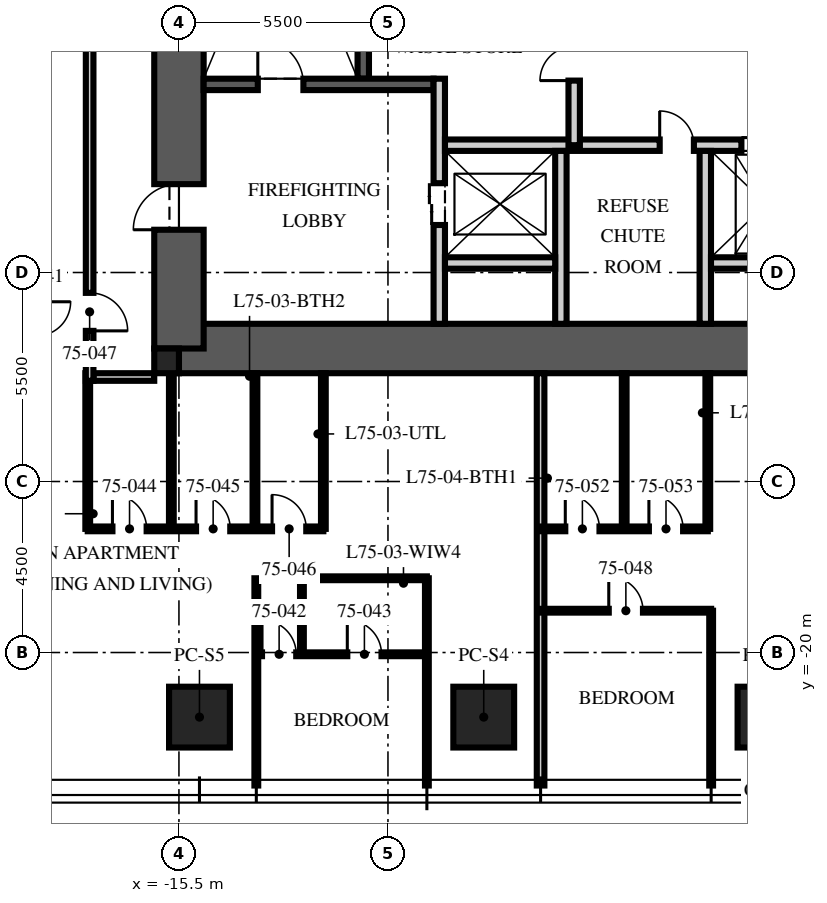
"""IFC4 building model, lengths in metres.
Left out: names, types, materials, properties, quantities, classifications, styles, units other than length and angle.
Written with IfcOpenShell. Run it as: python <this file> out.ifc"""

import sys

from ifc_helpers import new_model, si_unit, direction, frame, frame_2d, origin, origin_2d, place, context, subcontext, project, spatial, rectangle, extrude, element, fill, save


model = new_model("IFC4")
c1 = context("Model", 3, precision=1e-05, world=origin(), true_north=direction((0.0, 1.0)))
c2 = subcontext(c1, "Body", "Model", "MODEL_VIEW")
j1 = project(units=[si_unit("LENGTHUNIT", "METRE"), si_unit("PLANEANGLEUNIT", "RADIAN")], contexts=[c1])
p1 = place(None, origin())
s1 = spatial("IfcSite", under=j1, at=p1, CompositionType="ELEMENT")
p2 = place(p1, origin())
s2 = spatial("IfcBuilding", under=s1, at=p2, CompositionType="ELEMENT")
p3 = place(p2, frame((0.0, 0.0, 300.75)))
s3 = spatial("IfcBuildingStorey", under=s2, at=p3, CompositionType="ELEMENT", Elevation=300.75)
p4 = place(p3, frame((-15.5, -12.0, -0.25), z_axis=(0.0, 0.0, 1.0), x_axis=(1.0, 0.0, 0.0)))
e1 = element("IfcWall", 1, at=p4, inside=s3, PredefinedType="SHEAR", context=c2, shape_type="SweptSolid", body=[
    extrude(rectangle(XDim=31.0, YDim=1.3, at=frame_2d((15.5, 0.0))), origin(), (0.0, 0.0, 1.0), 3.75),
])
p5 = place(p3, frame((-15.5, -12.0, -0.25), z_axis=(0.0, 0.0, 1.0), x_axis=(0.0, 1.0, 0.0)))
e2 = element("IfcWall", 2, at=p5, inside=s3, PredefinedType="SHEAR", context=c2, shape_type="SweptSolid", body=[
    extrude(rectangle(XDim=24.0, YDim=1.3, at=frame_2d((12.0, 0.0))), origin(), (0.0, 0.0, 1.0), 3.75),
])
p6 = place(p5, frame((3.125, 0.0, 0.25)))
e3 = element("IfcOpeningElement", 3, at=p6, cuts=e2, PredefinedType="OPENING", context=c2, shape_type="SweptSolid", body=[
    extrude(rectangle(XDim=1.2, YDim=2.1, at=frame_2d((0.6, 1.05))), frame((0.0, 0.66, 0.0), z_axis=(0.0, -1.0, 0.0), x_axis=(1.0, 0.0, 0.0)), (0.0, 0.0, 1.0), 1.32),
])
p7 = place(p5, frame((19.375, 0.0, 0.25)))
e4 = element("IfcOpeningElement", 4, at=p7, cuts=e2, PredefinedType="OPENING", context=c2, shape_type="SweptSolid", body=[
    extrude(rectangle(XDim=1.8, YDim=2.1, at=frame_2d((0.9, 1.05))), frame((0.0, 0.66, 0.0), z_axis=(0.0, -1.0, 0.0), x_axis=(1.0, 0.0, 0.0)), (0.0, 0.0, 1.0), 1.32),
])
p8 = place(p3, frame((-15.825, -12.325, -0.25), z_axis=(0.0, 0.0, 1.0), x_axis=(1.0, 0.0, 0.0)))
e5 = element("IfcColumn", 5, at=p8, inside=s3, PredefinedType="COLUMN", context=c2, shape_type="SweptSolid", body=[
    extrude(rectangle(XDim=0.65, YDim=0.65, at=origin_2d()), origin(), (0.0, 0.0, 1.0), 3.75),
])
for number, where, z_axis, x_axis in (
    (6, (0.0, -21.7, 0.0), (0.0, 0.0, 1.0), (1.0, 0.0, 0.0)),
    (7, (-7.48, -21.7, 0.0), (0.0, 0.0, 1.0), (1.0, 0.0, 0.0)),
    (8, (-14.96, -21.7, 0.0), (0.0, 0.0, 1.0), (1.0, 0.0, 0.0)),
):
    element("IfcColumn", number, at=place(p3, frame(where, z_axis=z_axis, x_axis=x_axis)), inside=s3, PredefinedType="COLUMN", context=c2, shape_type="SweptSolid", body=[
        extrude(rectangle(XDim=1.6, YDim=1.6, at=origin_2d()), origin(), (0.0, 0.0, 1.0), 3.75),
    ])
p9 = place(p3, frame((-10.65, -4.9, 0.0), z_axis=(0.0, 0.0, 1.0), x_axis=(0.0, 1.0, 0.0)))
e9 = element("IfcWall", 9, at=p9, inside=s3, PredefinedType="SOLIDWALL", context=c2, shape_type="SweptSolid", body=[
    extrude(rectangle(XDim=10.1, YDim=0.3, at=frame_2d((5.05, 0.0))), origin(), (0.0, 0.0, 1.0), 3.5),
])
p10 = place(p3, frame((-14.85, -5.05, 0.0), z_axis=(0.0, 0.0, 1.0), x_axis=(1.0, 0.0, 0.0)))
e10 = element("IfcWall", 10, at=p10, inside=s3, PredefinedType="SOLIDWALL", context=c2, shape_type="SweptSolid", body=[
    extrude(rectangle(XDim=6.05, YDim=0.3, at=frame_2d((3.025, 0.0))), origin(), (0.0, 0.0, 1.0), 3.5),
])
p11 = place(p10, frame((1.425, 0.0, 0.0)))
e11 = element("IfcOpeningElement", 11, at=p11, cuts=e10, PredefinedType="OPENING", context=c2, shape_type="SweptSolid", body=[
    extrude(rectangle(XDim=1.2, YDim=2.1, at=frame_2d((0.6, 1.05))), frame((0.0, 0.16, 0.0), z_axis=(0.0, -1.0, 0.0), x_axis=(1.0, 0.0, 0.0)), (0.0, 0.0, 1.0), 0.32),
])
p12 = place(p3, frame((-8.65, -11.35, 0.0), z_axis=(0.0, 0.0, 1.0), x_axis=(0.0, 1.0, 0.0)))
e12 = element("IfcWall", 12, at=p12, inside=s3, PredefinedType="PARTITIONING", context=c2, shape_type="SweptSolid", body=[
    extrude(rectangle(XDim=6.45, YDim=0.3, at=frame_2d((3.225, 0.0))), origin(), (0.0, 0.0, 1.0), 3.5),
])
p13 = place(p12, frame((2.6, 0.0, 0.0)))
e13 = element("IfcOpeningElement", 13, at=p13, cuts=e12, PredefinedType="OPENING", context=c2, shape_type="SweptSolid", body=[
    extrude(rectangle(XDim=1.1, YDim=2.1, at=frame_2d((0.55, 1.05))), frame((0.0, 0.16, 0.0), z_axis=(0.0, -1.0, 0.0), x_axis=(1.0, 0.0, 0.0)), (0.0, 0.0, 1.0), 0.32),
])
p14 = place(p3, frame((-8.5, -6.65, 0.0), z_axis=(0.0, 0.0, 1.0), x_axis=(1.0, 0.0, 0.0)))
e14 = element("IfcWall", 14, at=p14, inside=s3, PredefinedType="PARTITIONING", context=c2, shape_type="SweptSolid", body=[
    extrude(rectangle(XDim=17.0, YDim=0.3, at=frame_2d((8.5, 0.0))), origin(), (0.0, 0.0, 1.0), 3.5),
])
p15 = place(p14, frame((7.8, 0.0, 0.0)))
e15 = element("IfcOpeningElement", 15, at=p15, cuts=e14, PredefinedType="OPENING", context=c2, shape_type="SweptSolid", body=[
    extrude(rectangle(XDim=1.3, YDim=2.4, at=frame_2d((0.65, 1.2))), frame((0.0, 0.16, 0.0), z_axis=(0.0, -1.0, 0.0), x_axis=(1.0, 0.0, 0.0)), (0.0, 0.0, 1.0), 0.32),
])
p16 = place(p14, frame((5.65, 0.0, 0.0)))
e16 = element("IfcOpeningElement", 16, at=p16, cuts=e14, PredefinedType="OPENING", context=c2, shape_type="SweptSolid", body=[
    extrude(rectangle(XDim=0.9, YDim=2.1, at=frame_2d((0.45, 1.05))), frame((0.0, 0.16, 0.0), z_axis=(0.0, -1.0, 0.0), x_axis=(1.0, 0.0, 0.0)), (0.0, 0.0, 1.0), 0.32),
])
p17 = place(p14, frame((10.4, 0.0, 0.0)))
e17 = element("IfcOpeningElement", 17, at=p17, cuts=e14, PredefinedType="OPENING", context=c2, shape_type="SweptSolid", body=[
    extrude(rectangle(XDim=0.9, YDim=2.1, at=frame_2d((0.45, 1.05))), frame((0.0, 0.16, 0.0), z_axis=(0.0, -1.0, 0.0), x_axis=(1.0, 0.0, 0.0)), (0.0, 0.0, 1.0), 0.32),
])
for number, where, z_axis, x_axis in (
    (18, (-5.45, -11.35, 0.0), (0.0, 0.0, 1.0), (0.0, 1.0, 0.0)),
    (19, (-1.65, -11.35, 0.0), (0.0, 0.0, 1.0), (0.0, 1.0, 0.0)),
):
    element("IfcWall", number, at=place(p3, frame(where, z_axis=z_axis, x_axis=x_axis)), inside=s3, PredefinedType="PARTITIONING", context=c2, shape_type="SweptSolid", body=[
        extrude(rectangle(XDim=4.55, YDim=0.3, at=frame_2d((2.275, 0.0))), origin(), (0.0, 0.0, 1.0), 3.5),
    ])
for number, where, z_axis, x_axis in (
    (20, (-8.5, -9.75, 0.0), (0.0, 0.0, 1.0), (1.0, 0.0, 0.0)),
    (21, (-1.5, -9.75, 0.0), (0.0, 0.0, 1.0), (1.0, 0.0, 0.0)),
):
    element("IfcWall", number, at=place(p3, frame(where, z_axis=z_axis, x_axis=x_axis)), inside=s3, PredefinedType="PARTITIONING", context=c2, shape_type="SweptSolid", body=[
        extrude(rectangle(XDim=2.9, YDim=0.3, at=frame_2d((1.45, 0.0))), origin(), (0.0, 0.0, 1.0), 3.5),
    ])
p18 = place(p3, frame((-5.1, -6.65, 0.0), z_axis=(0.0, 0.0, 1.0), x_axis=(0.0, 1.0, 0.0)))
e22 = element("IfcWall", 22, at=p18, inside=s3, PredefinedType="PARTITIONING", context=c2, shape_type="SweptSolid", body=[
    extrude(rectangle(XDim=8.45, YDim=0.3, at=frame_2d((4.225, 0.0))), origin(), (0.0, 0.0, 1.0), 3.5),
])
p19 = place(p18, frame((1.7, 0.0, 0.0)))
e23 = element("IfcOpeningElement", 23, at=p19, cuts=e22, PredefinedType="OPENING", context=c2, shape_type="SweptSolid", body=[
    extrude(rectangle(XDim=0.9, YDim=2.1, at=frame_2d((0.45, 1.05))), frame((0.0, 0.16, 0.0), z_axis=(0.0, -1.0, 0.0), x_axis=(1.0, 0.0, 0.0)), (0.0, 0.0, 1.0), 0.32),
])
p20 = place(p18, frame((5.925, 0.0, 0.0)))
e24 = element("IfcOpeningElement", 24, at=p20, cuts=e22, PredefinedType="OPENING", context=c2, shape_type="SweptSolid", body=[
    extrude(rectangle(XDim=0.9, YDim=2.1, at=frame_2d((0.45, 1.05))), frame((0.0, 0.16, 0.0), z_axis=(0.0, -1.0, 0.0), x_axis=(1.0, 0.0, 0.0)), (0.0, 0.0, 1.0), 0.32),
])
p21 = place(p3, frame((-16.15, -12.75, 0.0), z_axis=(0.0, 0.0, 1.0), x_axis=(-1.0, 0.0, 0.0)))
e25 = element("IfcWall", 25, at=p21, inside=s3, PredefinedType="PARTITIONING", context=c2, shape_type="SweptSolid", body=[
    extrude(rectangle(XDim=1.6, YDim=0.2, at=frame_2d((0.8, 0.0))), origin(), (0.0, 0.0, 1.0), 2.6),
])
for number, where, z_axis, x_axis in (
    (26, (-13.464, -18.046, 0.0), (0.0, 0.0, 1.0), (0.0, -1.0, 0.0)),
    (27, (-8.976, -18.046, 0.0), (0.0, 0.0, 1.0), (0.0, -1.0, 0.0)),
):
    element("IfcWall", number, at=place(p3, frame(where, z_axis=z_axis, x_axis=x_axis)), inside=s3, PredefinedType="PARTITIONING", context=c2, shape_type="SweptSolid", body=[
        extrude(rectangle(XDim=5.454, YDim=0.1, at=frame_2d((2.727, 0.0))), origin(), (0.0, 0.0, 1.0), 3.01),
    ])
p22 = place(p3, frame((-5.984, -12.65, 0.0), z_axis=(0.0, 0.0, 1.0), x_axis=(0.0, -1.0, 0.0)))
e28 = element("IfcWall", 28, at=p22, inside=s3, PredefinedType="PARTITIONING", context=c2, shape_type="SweptSolid", body=[
    extrude(rectangle(XDim=10.85, YDim=0.2, at=frame_2d((5.425, 0.0))), origin(), (0.0, 0.0, 1.0), 3.01),
])
p23 = place(p3, frame((-1.496, -18.9, 0.0), z_axis=(0.0, 0.0, 1.0), x_axis=(0.0, -1.0, 0.0)))
e29 = element("IfcWall", 29, at=p23, inside=s3, PredefinedType="PARTITIONING", context=c2, shape_type="SweptSolid", body=[
    extrude(rectangle(XDim=4.6, YDim=0.1, at=frame_2d((2.3, 0.0))), origin(), (0.0, 0.0, 1.0), 3.01),
])
p24 = place(p3, frame((-13.464, -20.046, 0.0), z_axis=(0.0, 0.0, 1.0), x_axis=(1.0, 0.0, 0.0)))
e30 = element("IfcWall", 30, at=p24, inside=s3, PredefinedType="PARTITIONING", context=c2, shape_type="SweptSolid", body=[
    extrude(rectangle(XDim=4.488, YDim=0.1, at=frame_2d((2.244, 0.0))), origin(), (0.0, 0.0, 1.0), 2.91),
])
p25 = place(p24, frame((0.15, 0.0, 0.0)))
e31 = element("IfcOpeningElement", 31, at=p25, cuts=e30, PredefinedType="OPENING", context=c2, shape_type="SweptSolid", body=[
    extrude(rectangle(XDim=0.9, YDim=2.1, at=frame_2d((0.45, 1.05))), frame((0.0, 0.06, 0.0), z_axis=(0.0, -1.0, 0.0), x_axis=(1.0, 0.0, 0.0)), (0.0, 0.0, 1.0), 0.12),
])
p26 = place(p24, frame((2.394, 0.0, 0.0)))
e32 = element("IfcOpeningElement", 32, at=p26, cuts=e30, PredefinedType="OPENING", context=c2, shape_type="SweptSolid", body=[
    extrude(rectangle(XDim=0.9, YDim=2.1, at=frame_2d((0.45, 1.05))), frame((0.0, 0.06, 0.0), z_axis=(0.0, -1.0, 0.0), x_axis=(1.0, 0.0, 0.0)), (0.0, 0.0, 1.0), 0.12),
])
p27 = place(p3, frame((-12.264, -18.046, 0.0), z_axis=(0.0, 0.0, 1.0), x_axis=(0.0, -1.0, 0.0)))
e33 = element("IfcWall", 33, at=p27, inside=s3, PredefinedType="PARTITIONING", context=c2, shape_type="SweptSolid", body=[
    extrude(rectangle(XDim=2.0, YDim=0.1, at=frame_2d((1.0, 0.0))), origin(), (0.0, 0.0, 1.0), 3.5),
])
p28 = place(p3, frame((-12.264, -18.046, 0.0), z_axis=(0.0, 0.0, 1.0), x_axis=(1.0, 0.0, 0.0)))
e34 = element("IfcWall", 34, at=p28, inside=s3, PredefinedType="PARTITIONING", context=c2, shape_type="SweptSolid", body=[
    extrude(rectangle(XDim=3.288, YDim=0.1, at=frame_2d((1.644, 0.0))), origin(), (0.0, 0.0, 1.0), 2.91),
])
p29 = place(p3, frame((-17.9, -16.746, 0.0), z_axis=(0.0, 0.0, 1.0), x_axis=(1.0, 0.0, 0.0)))
e35 = element("IfcWall", 35, at=p29, inside=s3, PredefinedType="PARTITIONING", context=c2, shape_type="SweptSolid", body=[
    extrude(rectangle(XDim=6.2, YDim=0.125, at=frame_2d((3.1, 0.0))), origin(), (0.0, 0.0, 1.0), 2.9),
])
p30 = place(p29, frame((0.65, 0.0, 0.0)))
e36 = element("IfcOpeningElement", 36, at=p30, cuts=e35, PredefinedType="OPENING", context=c2, shape_type="SweptSolid", body=[
    extrude(rectangle(XDim=0.9, YDim=2.1, at=frame_2d((0.45, 1.05))), frame((0.0, 0.073, 0.0), z_axis=(0.0, -1.0, 0.0), x_axis=(1.0, 0.0, 0.0)), (0.0, 0.0, 1.0), 0.145),
])
p31 = place(p29, frame((2.85, 0.0, 0.0)))
e37 = element("IfcOpeningElement", 37, at=p31, cuts=e35, PredefinedType="OPENING", context=c2, shape_type="SweptSolid", body=[
    extrude(rectangle(XDim=0.9, YDim=2.1, at=frame_2d((0.45, 1.05))), frame((0.0, 0.073, 0.0), z_axis=(0.0, -1.0, 0.0), x_axis=(1.0, 0.0, 0.0)), (0.0, 0.0, 1.0), 0.145),
])
p32 = place(p29, frame((4.85, 0.0, 0.0)))
e38 = element("IfcOpeningElement", 38, at=p32, cuts=e35, PredefinedType="OPENING", context=c2, shape_type="SweptSolid", body=[
    extrude(rectangle(XDim=0.9, YDim=2.1, at=frame_2d((0.45, 1.05))), frame((0.0, 0.073, 0.0), z_axis=(0.0, -1.0, 0.0), x_axis=(1.0, 0.0, 0.0)), (0.0, 0.0, 1.0), 0.145),
])
for number, where, z_axis, x_axis in (
    (39, (-17.9, -12.65, 0.0), (0.0, 0.0, 1.0), (0.0, -1.0, 0.0)),
    (40, (-15.7, -12.65, 0.0), (0.0, 0.0, 1.0), (0.0, -1.0, 0.0)),
):
    element("IfcWall", number, at=place(p3, frame(where, z_axis=z_axis, x_axis=x_axis)), inside=s3, PredefinedType="PARTITIONING", context=c2, shape_type="SweptSolid", body=[
        extrude(rectangle(XDim=4.096, YDim=0.125, at=frame_2d((2.048, 0.0))), origin(), (0.0, 0.0, 1.0), 2.6),
    ])
for number, where, z_axis, x_axis in (
    (41, (-13.5, -12.65, 0.0), (0.0, 0.0, 1.0), (0.0, -1.0, 0.0)),
    (42, (-11.7, -12.65, 0.0), (0.0, 0.0, 1.0), (0.0, -1.0, 0.0)),
):
    element("IfcWall", number, at=place(p3, frame(where, z_axis=z_axis, x_axis=x_axis)), inside=s3, PredefinedType="PARTITIONING", context=c2, shape_type="SweptSolid", body=[
        extrude(rectangle(XDim=4.096, YDim=0.125, at=frame_2d((2.048, 0.0))), origin(), (0.0, 0.0, 1.0), 3.5),
    ])
p33 = place(p3, frame((-5.984, -18.9, 0.0), z_axis=(0.0, 0.0, 1.0), x_axis=(1.0, 0.0, 0.0)))
e43 = element("IfcWall", 43, at=p33, inside=s3, PredefinedType="PARTITIONING", context=c2, shape_type="SweptSolid", body=[
    extrude(rectangle(XDim=4.488, YDim=0.1, at=frame_2d((2.244, 0.0))), origin(), (0.0, 0.0, 1.0), 2.91),
])
p34 = place(p33, frame((1.794, 0.0, 0.0)))
e44 = element("IfcOpeningElement", 44, at=p34, cuts=e43, PredefinedType="OPENING", context=c2, shape_type="SweptSolid", body=[
    extrude(rectangle(XDim=0.9, YDim=2.1, at=frame_2d((0.45, 1.05))), frame((0.0, 0.06, 0.0), z_axis=(0.0, -1.0, 0.0), x_axis=(1.0, 0.0, 0.0)), (0.0, 0.0, 1.0), 0.12),
])
p35 = place(p3, frame((-5.984, -16.746, 0.0), z_axis=(0.0, 0.0, 1.0), x_axis=(1.0, 0.0, 0.0)))
e45 = element("IfcWall", 45, at=p35, inside=s3, PredefinedType="PARTITIONING", context=c2, shape_type="SweptSolid", body=[
    extrude(rectangle(XDim=4.4, YDim=0.125, at=frame_2d((2.2, 0.0))), origin(), (0.0, 0.0, 1.0), 2.91),
])
p36 = place(p35, frame((0.65, 0.0, 0.0)))
e46 = element("IfcOpeningElement", 46, at=p36, cuts=e45, PredefinedType="OPENING", context=c2, shape_type="SweptSolid", body=[
    extrude(rectangle(XDim=0.9, YDim=2.1, at=frame_2d((0.45, 1.05))), frame((0.0, 0.073, 0.0), z_axis=(0.0, -1.0, 0.0), x_axis=(1.0, 0.0, 0.0)), (0.0, 0.0, 1.0), 0.145),
])
p37 = place(p35, frame((2.85, 0.0, 0.0)))
e47 = element("IfcOpeningElement", 47, at=p37, cuts=e45, PredefinedType="OPENING", context=c2, shape_type="SweptSolid", body=[
    extrude(rectangle(XDim=0.9, YDim=2.1, at=frame_2d((0.45, 1.05))), frame((0.0, 0.073, 0.0), z_axis=(0.0, -1.0, 0.0), x_axis=(1.0, 0.0, 0.0)), (0.0, 0.0, 1.0), 0.145),
])
p38 = place(p3, frame((-3.784, -12.65, 0.0), z_axis=(0.0, 0.0, 1.0), x_axis=(0.0, -1.0, 0.0)))
e48 = element("IfcWall", 48, at=p38, inside=s3, PredefinedType="PARTITIONING", context=c2, shape_type="SweptSolid", body=[
    extrude(rectangle(XDim=4.096, YDim=0.125, at=frame_2d((2.048, 0.0))), origin(), (0.0, 0.0, 1.0), 2.91),
])
p39 = place(p3, frame((-1.584, -12.65, 0.0), z_axis=(0.0, 0.0, 1.0), x_axis=(0.0, -1.0, 0.0)))
e49 = element("IfcWall", 49, at=p39, inside=s3, PredefinedType="PARTITIONING", context=c2, shape_type="SweptSolid", body=[
    extrude(rectangle(XDim=4.096, YDim=0.125, at=frame_2d((2.048, 0.0))), origin(), (0.0, 0.0, 1.0), 3.5),
])
p40 = place(p3, frame((-17.85, 12.85, 0.0), z_axis=(0.0, 0.0, 1.0), x_axis=(0.0, -1.0, 0.0)))
e50 = element("IfcWall", 50, at=p40, inside=s3, PredefinedType="PARTITIONING", context=c2, shape_type="SweptSolid", body=[
    extrude(rectangle(XDim=25.7, YDim=0.2, at=frame_2d((12.85, 0.0))), origin(), (0.0, 0.0, 1.0), 2.9),
])
p41 = place(p40, frame((5.1, 0.0, 0.0)))
e51 = element("IfcOpeningElement", 51, at=p41, cuts=e50, PredefinedType="OPENING", context=c2, shape_type="SweptSolid", body=[
    extrude(rectangle(XDim=1.0, YDim=2.2, at=frame_2d((0.5, 1.1))), frame((0.0, 0.11, 0.0), z_axis=(0.0, -1.0, 0.0), x_axis=(1.0, 0.0, 0.0)), (0.0, 0.0, 1.0), 0.22),
])
p42 = place(p40, frame((23.386, 0.0, 0.0)))
e52 = element("IfcOpeningElement", 52, at=p42, cuts=e50, PredefinedType="OPENING", context=c2, shape_type="SweptSolid", body=[
    extrude(rectangle(XDim=1.0, YDim=2.2, at=frame_2d((0.5, 1.1))), frame((0.0, 0.11, 0.0), z_axis=(0.0, -1.0, 0.0), x_axis=(1.0, 0.0, 0.0)), (0.0, 0.0, 1.0), 0.22),
])
p43 = place(p11, origin())
e53 = element("IfcDoor", 53, at=p43, inside=s3, OperationType="SINGLE_SWING_LEFT", PredefinedType="DOOR", context=c2, shape_type="SweptSolid", body=[
    extrude(rectangle(XDim=1.2, YDim=2.1, at=frame_2d((0.6, 1.05))), frame((0.0, 0.025, 0.0), z_axis=(0.0, -1.0, 0.0), x_axis=(1.0, 0.0, 0.0)), (0.0, 0.0, 1.0), 0.05),
])
fill(e11, e53)
p44 = place(p6, origin())
e54 = element("IfcDoor", 54, at=p44, inside=s3, OperationType="SINGLE_SWING_LEFT", PredefinedType="DOOR", context=c2, shape_type="SweptSolid", body=[
    extrude(rectangle(XDim=1.2, YDim=2.1, at=frame_2d((0.6, 1.05))), frame((0.0, 0.025, 0.0), z_axis=(0.0, -1.0, 0.0), x_axis=(1.0, 0.0, 0.0)), (0.0, 0.0, 1.0), 0.05),
])
fill(e3, e54)
p45 = place(p13, origin())
e55 = element("IfcDoor", 55, at=p45, inside=s3, OperationType="DOUBLE_DOOR_SLIDING", PredefinedType="DOOR", context=c2, shape_type="SweptSolid", body=[
    extrude(rectangle(XDim=1.1, YDim=2.1, at=frame_2d((0.55, 1.05))), frame((0.0, 0.025, 0.0), z_axis=(0.0, -1.0, 0.0), x_axis=(1.0, 0.0, 0.0)), (0.0, 0.0, 1.0), 0.05),
])
fill(e13, e55)
p46 = place(p15, origin())
e56 = element("IfcDoor", 56, at=p46, inside=s3, OperationType="DOUBLE_DOOR_SLIDING", PredefinedType="DOOR", context=c2, shape_type="SweptSolid", body=[
    extrude(rectangle(XDim=1.3, YDim=2.4, at=frame_2d((0.65, 1.2))), frame((0.0, 0.025, 0.0), z_axis=(0.0, -1.0, 0.0), x_axis=(1.0, 0.0, 0.0)), (0.0, 0.0, 1.0), 0.05),
])
fill(e15, e56)
p47 = place(p16, origin())
e57 = element("IfcDoor", 57, at=p47, inside=s3, OperationType="SINGLE_SWING_LEFT", PredefinedType="DOOR", context=c2, shape_type="SweptSolid", body=[
    extrude(rectangle(XDim=0.9, YDim=2.1, at=frame_2d((0.45, 1.05))), frame((0.0, 0.025, 0.0), z_axis=(0.0, -1.0, 0.0), x_axis=(1.0, 0.0, 0.0)), (0.0, 0.0, 1.0), 0.05),
])
fill(e16, e57)
p48 = place(p19, origin())
e58 = element("IfcDoor", 58, at=p48, inside=s3, OperationType="SINGLE_SWING_LEFT", PredefinedType="DOOR", context=c2, shape_type="SweptSolid", body=[
    extrude(rectangle(XDim=0.9, YDim=2.1, at=frame_2d((0.45, 1.05))), frame((0.0, 0.025, 0.0), z_axis=(0.0, -1.0, 0.0), x_axis=(1.0, 0.0, 0.0)), (0.0, 0.0, 1.0), 0.05),
])
fill(e23, e58)
p49 = place(p25, origin())
e59 = element("IfcDoor", 59, at=p49, inside=s3, OperationType="SINGLE_SWING_LEFT", PredefinedType="DOOR", context=c2, shape_type="SweptSolid", body=[
    extrude(rectangle(XDim=0.9, YDim=2.1, at=frame_2d((0.45, 1.05))), frame((0.0, 0.025, 0.0), z_axis=(0.0, -1.0, 0.0), x_axis=(1.0, 0.0, 0.0)), (0.0, 0.0, 1.0), 0.05),
])
fill(e31, e59)
p50 = place(p26, origin())
e60 = element("IfcDoor", 60, at=p50, inside=s3, OperationType="SINGLE_SWING_LEFT", PredefinedType="DOOR", context=c2, shape_type="SweptSolid", body=[
    extrude(rectangle(XDim=0.9, YDim=2.1, at=frame_2d((0.45, 1.05))), frame((0.0, 0.025, 0.0), z_axis=(0.0, -1.0, 0.0), x_axis=(1.0, 0.0, 0.0)), (0.0, 0.0, 1.0), 0.05),
])
fill(e32, e60)
p51 = place(p30, origin())
e61 = element("IfcDoor", 61, at=p51, inside=s3, OperationType="SINGLE_SWING_LEFT", PredefinedType="DOOR", context=c2, shape_type="SweptSolid", body=[
    extrude(rectangle(XDim=0.9, YDim=2.1, at=frame_2d((0.45, 1.05))), frame((0.0, 0.025, 0.0), z_axis=(0.0, -1.0, 0.0), x_axis=(1.0, 0.0, 0.0)), (0.0, 0.0, 1.0), 0.05),
])
fill(e36, e61)
p52 = place(p31, origin())
e62 = element("IfcDoor", 62, at=p52, inside=s3, OperationType="SINGLE_SWING_LEFT", PredefinedType="DOOR", context=c2, shape_type="SweptSolid", body=[
    extrude(rectangle(XDim=0.9, YDim=2.1, at=frame_2d((0.45, 1.05))), frame((0.0, 0.025, 0.0), z_axis=(0.0, -1.0, 0.0), x_axis=(1.0, 0.0, 0.0)), (0.0, 0.0, 1.0), 0.05),
])
fill(e37, e62)
p53 = place(p32, origin())
e63 = element("IfcDoor", 63, at=p53, inside=s3, OperationType="SINGLE_SWING_LEFT", PredefinedType="DOOR", context=c2, shape_type="SweptSolid", body=[
    extrude(rectangle(XDim=0.9, YDim=2.1, at=frame_2d((0.45, 1.05))), frame((0.0, 0.025, 0.0), z_axis=(0.0, -1.0, 0.0), x_axis=(1.0, 0.0, 0.0)), (0.0, 0.0, 1.0), 0.05),
])
fill(e38, e63)
p54 = place(p42, origin())
e64 = element("IfcDoor", 64, at=p54, inside=s3, OperationType="SINGLE_SWING_RIGHT", PredefinedType="DOOR", context=c2, shape_type="SweptSolid", body=[
    extrude(rectangle(XDim=1.0, YDim=2.2, at=frame_2d((0.5, 1.1))), frame((0.0, 0.025, 0.0), z_axis=(0.0, -1.0, 0.0), x_axis=(1.0, 0.0, 0.0)), (0.0, 0.0, 1.0), 0.05),
])
fill(e52, e64)
p55 = place(p34, origin())
e65 = element("IfcDoor", 65, at=p55, inside=s3, OperationType="SINGLE_SWING_LEFT", PredefinedType="DOOR", context=c2, shape_type="SweptSolid", body=[
    extrude(rectangle(XDim=0.9, YDim=2.1, at=frame_2d((0.45, 1.05))), frame((0.0, 0.025, 0.0), z_axis=(0.0, -1.0, 0.0), x_axis=(1.0, 0.0, 0.0)), (0.0, 0.0, 1.0), 0.05),
])
fill(e44, e65)
p56 = place(p36, origin())
e66 = element("IfcDoor", 66, at=p56, inside=s3, OperationType="SINGLE_SWING_LEFT", PredefinedType="DOOR", context=c2, shape_type="SweptSolid", body=[
    extrude(rectangle(XDim=0.9, YDim=2.1, at=frame_2d((0.45, 1.05))), frame((0.0, 0.025, 0.0), z_axis=(0.0, -1.0, 0.0), x_axis=(1.0, 0.0, 0.0)), (0.0, 0.0, 1.0), 0.05),
])
fill(e46, e66)
p57 = place(p37, origin())
e67 = element("IfcDoor", 67, at=p57, inside=s3, OperationType="SINGLE_SWING_LEFT", PredefinedType="DOOR", context=c2, shape_type="SweptSolid", body=[
    extrude(rectangle(XDim=0.9, YDim=2.1, at=frame_2d((0.45, 1.05))), frame((0.0, 0.025, 0.0), z_axis=(0.0, -1.0, 0.0), x_axis=(1.0, 0.0, 0.0)), (0.0, 0.0, 1.0), 0.05),
])
fill(e47, e67)
save(model, sys.argv[1])
